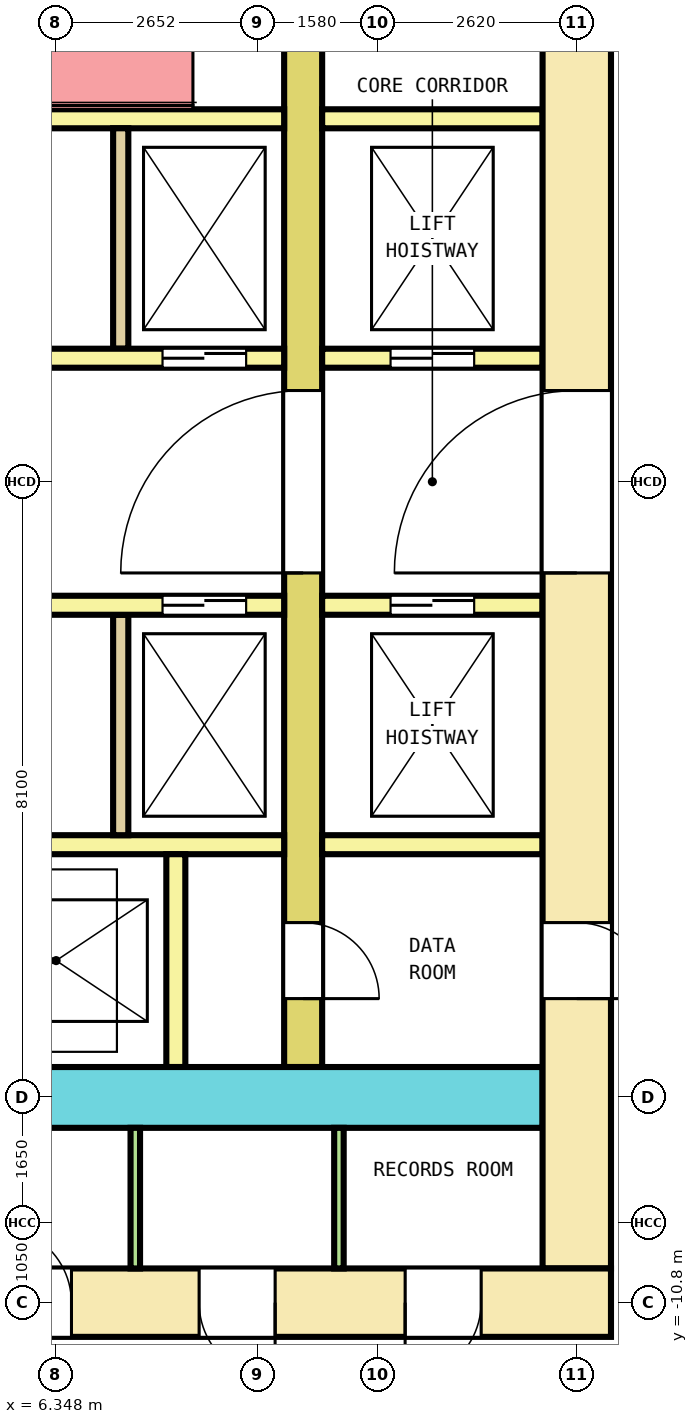
"""IFC4 building model, lengths in metres.
Left out: names, types, materials, properties, quantities, classifications, styles, units other than length and angle.
Written with IfcOpenShell. Run it as: python <this file> out.ifc"""

import sys

from ifc_helpers import new_model, si_unit, direction, frame, frame_2d, origin, place, context, subcontext, project, spatial, rectangle, extrude, element, fill, save


model = new_model("IFC4")
c1 = context("Model", 3, precision=1e-05, world=origin(), true_north=direction((0.0, 1.0)))
c2 = subcontext(c1, "Body", "Model", "MODEL_VIEW")
j1 = project(units=[si_unit("LENGTHUNIT", "METRE"), si_unit("PLANEANGLEUNIT", "RADIAN")], contexts=[c1])
p1 = place(None, origin())
s1 = spatial("IfcSite", under=j1, at=p1, CompositionType="ELEMENT")
p2 = place(p1, origin())
s2 = spatial("IfcBuilding", under=s1, at=p2, CompositionType="ELEMENT")
p3 = place(p2, frame((0.0, 0.0, 19.0)))
s3 = spatial("IfcBuildingStorey", under=s2, at=p3, CompositionType="ELEMENT", Elevation=19.0)
p4 = place(p3, frame((-13.65, -10.8, 0.0), z_axis=(0.0, 0.0, 1.0), x_axis=(1.0, 0.0, 0.0)))
e1 = element("IfcWall", 1, at=p4, inside=s3, PredefinedType="SHEAR", context=c2, shape_type="SweptSolid", body=[
    extrude(rectangle(XDim=27.3, YDim=0.9, at=frame_2d((13.65, 0.0))), origin(), (0.0, 0.0, 1.0), 4.1),
])
p5 = place(p4, frame((2.425, 0.0, 0.0)))
e2 = element("IfcOpeningElement", 2, at=p5, cuts=e1, PredefinedType="OPENING", context=c2, shape_type="SweptSolid", body=[
    extrude(rectangle(XDim=1.0, YDim=2.1, at=frame_2d((0.5, 1.05))), frame((0.0, 0.46, 0.0), z_axis=(0.0, -1.0, 0.0), x_axis=(1.0, 0.0, 0.0)), (0.0, 0.0, 1.0), 0.92),
])
p6 = place(p4, frame((6.569, 0.0, 0.0)))
e3 = element("IfcOpeningElement", 3, at=p6, cuts=e1, PredefinedType="OPENING", context=c2, shape_type="SweptSolid", body=[
    extrude(rectangle(XDim=1.0, YDim=2.1, at=frame_2d((0.5, 1.05))), frame((0.0, 0.46, 0.0), z_axis=(0.0, -1.0, 0.0), x_axis=(1.0, 0.0, 0.0)), (0.0, 0.0, 1.0), 0.92),
])
p7 = place(p4, frame((10.681, 0.0, 0.0)))
e4 = element("IfcOpeningElement", 4, at=p7, cuts=e1, PredefinedType="OPENING", context=c2, shape_type="SweptSolid", body=[
    extrude(rectangle(XDim=1.0, YDim=2.1, at=frame_2d((0.5, 1.05))), frame((0.0, 0.46, 0.0), z_axis=(0.0, -1.0, 0.0), x_axis=(1.0, 0.0, 0.0)), (0.0, 0.0, 1.0), 0.92),
])
p8 = place(p4, frame((19.202, 0.0, 0.0)))
e5 = element("IfcOpeningElement", 5, at=p8, cuts=e1, PredefinedType="OPENING", context=c2, shape_type="SweptSolid", body=[
    extrude(rectangle(XDim=1.0, YDim=2.1, at=frame_2d((0.5, 1.05))), frame((0.0, 0.46, 0.0), z_axis=(0.0, -1.0, 0.0), x_axis=(1.0, 0.0, 0.0)), (0.0, 0.0, 1.0), 0.92),
])
p9 = place(p4, frame((21.881, 0.0, 0.0)))
e6 = element("IfcOpeningElement", 6, at=p9, cuts=e1, PredefinedType="OPENING", context=c2, shape_type="SweptSolid", body=[
    extrude(rectangle(XDim=1.0, YDim=2.1, at=frame_2d((0.5, 1.05))), frame((0.0, 0.46, 0.0), z_axis=(0.0, -1.0, 0.0), x_axis=(1.0, 0.0, 0.0)), (0.0, 0.0, 1.0), 0.92),
])
p10 = place(p4, frame((24.592, 0.0, 0.0)))
e7 = element("IfcOpeningElement", 7, at=p10, cuts=e1, PredefinedType="OPENING", context=c2, shape_type="SweptSolid", body=[
    extrude(rectangle(XDim=1.0, YDim=2.1, at=frame_2d((0.5, 1.05))), frame((0.0, 0.46, 0.0), z_axis=(0.0, -1.0, 0.0), x_axis=(1.0, 0.0, 0.0)), (0.0, 0.0, 1.0), 0.92),
])
p11 = place(p4, frame((15.2, 0.0, 0.0)))
e8 = element("IfcOpeningElement", 8, at=p11, cuts=e1, PredefinedType="OPENING", context=c2, shape_type="SweptSolid", body=[
    extrude(rectangle(XDim=1.2, YDim=2.1, at=frame_2d((0.6, 1.05))), frame((0.0, 0.46, 0.0), z_axis=(0.0, -1.0, 0.0), x_axis=(1.0, 0.0, 0.0)), (0.0, 0.0, 1.0), 0.92),
])
p12 = place(p3, frame((13.2, -10.35, 0.0), z_axis=(0.0, 0.0, 1.0), x_axis=(0.0, 1.0, 0.0)))
e9 = element("IfcWall", 9, at=p12, inside=s3, PredefinedType="SHEAR", context=c2, shape_type="SweptSolid", body=[
    extrude(rectangle(XDim=20.7, YDim=0.9, at=frame_2d((10.35, 0.0))), origin(), (0.0, 0.0, 1.0), 4.1),
])
p13 = place(p12, frame((9.15, 0.0, 0.0)))
e10 = element("IfcOpeningElement", 10, at=p13, cuts=e9, PredefinedType="OPENING", context=c2, shape_type="SweptSolid", body=[
    extrude(rectangle(XDim=2.4, YDim=2.1, at=frame_2d((1.2, 1.05))), frame((0.0, 0.46, 0.0), z_axis=(0.0, -1.0, 0.0), x_axis=(1.0, 0.0, 0.0)), (0.0, 0.0, 1.0), 0.92),
])
p14 = place(p12, frame((16.05, 0.0, 0.0)))
e11 = element("IfcOpeningElement", 11, at=p14, cuts=e9, PredefinedType="OPENING", context=c2, shape_type="SweptSolid", body=[
    extrude(rectangle(XDim=1.2, YDim=2.1, at=frame_2d((0.6, 1.05))), frame((0.0, 0.46, 0.0), z_axis=(0.0, -1.0, 0.0), x_axis=(1.0, 0.0, 0.0)), (0.0, 0.0, 1.0), 0.92),
])
p15 = place(p12, frame((3.55, 0.0, 0.0)))
e12 = element("IfcOpeningElement", 12, at=p15, cuts=e9, PredefinedType="OPENING", context=c2, shape_type="SweptSolid", body=[
    extrude(rectangle(XDim=1.0, YDim=2.1, at=frame_2d((0.5, 1.05))), frame((0.0, 0.46, 0.0), z_axis=(0.0, -1.0, 0.0), x_axis=(1.0, 0.0, 0.0)), (0.0, 0.0, 1.0), 0.92),
])
p16 = place(p3, frame((-12.75, -8.1, 0.0), z_axis=(0.0, 0.0, 1.0), x_axis=(1.0, 0.0, 0.0)))
e13 = element("IfcWall", 13, at=p16, inside=s3, PredefinedType="SHEAR", context=c2, shape_type="SweptSolid", body=[
    extrude(rectangle(XDim=25.5, YDim=0.8, at=frame_2d((12.75, 0.0))), origin(), (0.0, 0.0, 1.0), 4.1),
])
p17 = place(p16, frame((14.3, 0.0, 0.0)))
e14 = element("IfcOpeningElement", 14, at=p17, cuts=e13, PredefinedType="OPENING", context=c2, shape_type="SweptSolid", body=[
    extrude(rectangle(XDim=1.2, YDim=2.1, at=frame_2d((0.6, 1.05))), frame((0.0, 0.41, 0.0), z_axis=(0.0, -1.0, 0.0), x_axis=(1.0, 0.0, 0.0)), (0.0, 0.0, 1.0), 0.82),
])
p18 = place(p3, frame((9.6, -7.7, 0.0), z_axis=(0.0, 0.0, 1.0), x_axis=(0.0, 1.0, 0.0)))
e15 = element("IfcWall", 15, at=p18, inside=s3, PredefinedType="SHEAR", context=c2, shape_type="SweptSolid", body=[
    extrude(rectangle(XDim=15.4, YDim=0.5, at=frame_2d((7.7, 0.0))), origin(), (0.0, 0.0, 1.0), 4.1),
])
p19 = place(p18, frame((6.5, 0.0, 0.0)))
e16 = element("IfcOpeningElement", 16, at=p19, cuts=e15, PredefinedType="OPENING", context=c2, shape_type="SweptSolid", body=[
    extrude(rectangle(XDim=2.4, YDim=2.1, at=frame_2d((1.2, 1.05))), frame((0.0, 0.26, 0.0), z_axis=(0.0, -1.0, 0.0), x_axis=(1.0, 0.0, 0.0)), (0.0, 0.0, 1.0), 0.52),
])
p20 = place(p18, frame((13.4, 0.0, 0.0)))
e17 = element("IfcOpeningElement", 17, at=p20, cuts=e15, PredefinedType="OPENING", context=c2, shape_type="SweptSolid", body=[
    extrude(rectangle(XDim=1.2, YDim=2.1, at=frame_2d((0.6, 1.05))), frame((0.0, 0.26, 0.0), z_axis=(0.0, -1.0, 0.0), x_axis=(1.0, 0.0, 0.0)), (0.0, 0.0, 1.0), 0.52),
])
p21 = place(p18, frame((0.9, 0.0, 0.0)))
e18 = element("IfcOpeningElement", 18, at=p21, cuts=e15, PredefinedType="OPENING", context=c2, shape_type="SweptSolid", body=[
    extrude(rectangle(XDim=1.0, YDim=2.1, at=frame_2d((0.5, 1.05))), frame((0.0, 0.26, 0.0), z_axis=(0.0, -1.0, 0.0), x_axis=(1.0, 0.0, 0.0)), (0.0, 0.0, 1.0), 0.52),
])
p22 = place(p3, frame((-9.35, 1.625, 0.0), z_axis=(0.0, 0.0, 1.0), x_axis=(1.0, 0.0, 0.0)))
e19 = element("IfcWall", 19, at=p22, inside=s3, PredefinedType="SOLIDWALL", context=c2, shape_type="SweptSolid", body=[
    extrude(rectangle(XDim=18.7, YDim=0.25, at=frame_2d((9.35, 0.0))), origin(), (0.0, 0.0, 1.0), 4.1),
])
p23 = place(p22, frame((0.5, 0.0, 0.0)))
e20 = element("IfcOpeningElement", 20, at=p23, cuts=e19, PredefinedType="OPENING", context=c2, shape_type="SweptSolid", body=[
    extrude(rectangle(XDim=1.1, YDim=2.1, at=frame_2d((0.55, 1.05))), frame((0.0, 0.135, 0.0), z_axis=(0.0, -1.0, 0.0), x_axis=(1.0, 0.0, 0.0)), (0.0, 0.0, 1.0), 0.27),
])
p24 = place(p22, frame((17.1, 0.0, 0.0)))
e21 = element("IfcOpeningElement", 21, at=p24, cuts=e19, PredefinedType="OPENING", context=c2, shape_type="SweptSolid", body=[
    extrude(rectangle(XDim=1.1, YDim=2.1, at=frame_2d((0.55, 1.05))), frame((0.0, 0.135, 0.0), z_axis=(0.0, -1.0, 0.0), x_axis=(1.0, 0.0, 0.0)), (0.0, 0.0, 1.0), 0.27),
])
p25 = place(p3, frame((9.85, 1.625, 0.0), z_axis=(0.0, 0.0, 1.0), x_axis=(1.0, 0.0, 0.0)))
e22 = element("IfcWall", 22, at=p25, inside=s3, PredefinedType="SOLIDWALL", context=c2, shape_type="SweptSolid", body=[
    extrude(rectangle(XDim=2.9, YDim=0.25, at=frame_2d((1.45, 0.0))), origin(), (0.0, 0.0, 1.0), 4.1),
])
p26 = place(p25, frame((0.9, 0.0, 0.0)))
e23 = element("IfcOpeningElement", 23, at=p26, cuts=e22, PredefinedType="OPENING", context=c2, shape_type="SweptSolid", body=[
    extrude(rectangle(XDim=1.1, YDim=2.1, at=frame_2d((0.55, 1.05))), frame((0.0, 0.135, 0.0), z_axis=(0.0, -1.0, 0.0), x_axis=(1.0, 0.0, 0.0)), (0.0, 0.0, 1.0), 0.27),
])
p27 = place(p3, frame((-9.35, 4.775, 0.0), z_axis=(0.0, 0.0, 1.0), x_axis=(1.0, 0.0, 0.0)))
e24 = element("IfcWall", 24, at=p27, inside=s3, PredefinedType="SOLIDWALL", context=c2, shape_type="SweptSolid", body=[
    extrude(rectangle(XDim=18.7, YDim=0.25, at=frame_2d((9.35, 0.0))), origin(), (0.0, 0.0, 1.0), 4.1),
])
p28 = place(p3, frame((9.85, 4.775, 0.0), z_axis=(0.0, 0.0, 1.0), x_axis=(1.0, 0.0, 0.0)))
e25 = element("IfcWall", 25, at=p28, inside=s3, PredefinedType="SOLIDWALL", context=c2, shape_type="SweptSolid", body=[
    extrude(rectangle(XDim=2.9, YDim=0.25, at=frame_2d((1.45, 0.0))), origin(), (0.0, 0.0, 1.0), 4.1),
])
p29 = place(p3, frame((7.2, 1.75, 0.0), z_axis=(0.0, 0.0, 1.0), x_axis=(0.0, 1.0, 0.0)))
e26 = element("IfcWall", 26, at=p29, inside=s3, PredefinedType="SOLIDWALL", context=c2, shape_type="SweptSolid", body=[
    extrude(rectangle(XDim=2.9, YDim=0.2, at=frame_2d((1.45, 0.0))), origin(), (0.0, 0.0, 1.0), 4.1),
])
p30 = place(p3, frame((-9.35, -1.625, 0.0), z_axis=(0.0, 0.0, 1.0), x_axis=(1.0, 0.0, 0.0)))
e27 = element("IfcWall", 27, at=p30, inside=s3, PredefinedType="SOLIDWALL", context=c2, shape_type="SweptSolid", body=[
    extrude(rectangle(XDim=18.7, YDim=0.25, at=frame_2d((9.35, 0.0))), origin(), (0.0, 0.0, 1.0), 4.1),
])
p31 = place(p30, frame((0.5, 0.0, 0.0)))
e28 = element("IfcOpeningElement", 28, at=p31, cuts=e27, PredefinedType="OPENING", context=c2, shape_type="SweptSolid", body=[
    extrude(rectangle(XDim=1.1, YDim=2.1, at=frame_2d((0.55, 1.05))), frame((0.0, 0.135, 0.0), z_axis=(0.0, -1.0, 0.0), x_axis=(1.0, 0.0, 0.0)), (0.0, 0.0, 1.0), 0.27),
])
p32 = place(p30, frame((17.1, 0.0, 0.0)))
e29 = element("IfcOpeningElement", 29, at=p32, cuts=e27, PredefinedType="OPENING", context=c2, shape_type="SweptSolid", body=[
    extrude(rectangle(XDim=1.1, YDim=2.1, at=frame_2d((0.55, 1.05))), frame((0.0, 0.135, 0.0), z_axis=(0.0, -1.0, 0.0), x_axis=(1.0, 0.0, 0.0)), (0.0, 0.0, 1.0), 0.27),
])
p33 = place(p3, frame((9.85, -1.625, 0.0), z_axis=(0.0, 0.0, 1.0), x_axis=(1.0, 0.0, 0.0)))
e30 = element("IfcWall", 30, at=p33, inside=s3, PredefinedType="SOLIDWALL", context=c2, shape_type="SweptSolid", body=[
    extrude(rectangle(XDim=2.9, YDim=0.25, at=frame_2d((1.45, 0.0))), origin(), (0.0, 0.0, 1.0), 4.1),
])
p34 = place(p33, frame((0.9, 0.0, 0.0)))
e31 = element("IfcOpeningElement", 31, at=p34, cuts=e30, PredefinedType="OPENING", context=c2, shape_type="SweptSolid", body=[
    extrude(rectangle(XDim=1.1, YDim=2.1, at=frame_2d((0.55, 1.05))), frame((0.0, 0.135, 0.0), z_axis=(0.0, -1.0, 0.0), x_axis=(1.0, 0.0, 0.0)), (0.0, 0.0, 1.0), 0.27),
])
p35 = place(p3, frame((-9.35, -4.775, 0.0), z_axis=(0.0, 0.0, 1.0), x_axis=(1.0, 0.0, 0.0)))
e32 = element("IfcWall", 32, at=p35, inside=s3, PredefinedType="SOLIDWALL", context=c2, shape_type="SweptSolid", body=[
    extrude(rectangle(XDim=18.7, YDim=0.25, at=frame_2d((9.35, 0.0))), origin(), (0.0, 0.0, 1.0), 4.1),
])
p36 = place(p3, frame((9.85, -4.775, 0.0), z_axis=(0.0, 0.0, 1.0), x_axis=(1.0, 0.0, 0.0)))
e33 = element("IfcWall", 33, at=p36, inside=s3, PredefinedType="SOLIDWALL", context=c2, shape_type="SweptSolid", body=[
    extrude(rectangle(XDim=2.9, YDim=0.25, at=frame_2d((1.45, 0.0))), origin(), (0.0, 0.0, 1.0), 4.1),
])
p37 = place(p3, frame((7.2, -4.65, 0.0), z_axis=(0.0, 0.0, 1.0), x_axis=(0.0, 1.0, 0.0)))
e34 = element("IfcWall", 34, at=p37, inside=s3, PredefinedType="SOLIDWALL", context=c2, shape_type="SweptSolid", body=[
    extrude(rectangle(XDim=2.9, YDim=0.2, at=frame_2d((1.45, 0.0))), origin(), (0.0, 0.0, 1.0), 4.1),
])
p38 = place(p3, frame((7.925, -7.7, 0.0), z_axis=(0.0, 0.0, 1.0), x_axis=(0.0, 1.0, 0.0)))
e35 = element("IfcWall", 35, at=p38, inside=s3, PredefinedType="SOLIDWALL", context=c2, shape_type="SweptSolid", body=[
    extrude(rectangle(XDim=2.8, YDim=0.25, at=frame_2d((1.4, 0.0))), origin(), (0.0, 0.0, 1.0), 4.1),
])
for number, where, z_axis, x_axis in (
    (36, (7.392, -10.35, 0.0), (0.0, 0.0, 1.0), (0.0, 1.0, 0.0)),
    (37, (10.071, -10.35, 0.0), (0.0, 0.0, 1.0), (0.0, 1.0, 0.0)),
):
    element("IfcWall", number, at=place(p3, frame(where, z_axis=z_axis, x_axis=x_axis)), inside=s3, PredefinedType="PARTITIONING", context=c2, shape_type="SweptSolid", body=[
        extrude(rectangle(XDim=1.85, YDim=0.125, at=frame_2d((0.925, 0.0))), origin(), (0.0, 0.0, 1.0), 4.1),
    ])
p39 = place(p24, origin())
e38 = element("IfcDoor", 38, at=p39, inside=s3, OperationType="DOUBLE_DOOR_SLIDING", PredefinedType="DOOR", context=c2, shape_type="SweptSolid", body=[
    extrude(rectangle(XDim=1.1, YDim=2.1, at=frame_2d((0.55, 1.05))), frame((0.0, 0.075, 0.0), z_axis=(0.0, -1.0, 0.0), x_axis=(1.0, 0.0, 0.0)), (0.0, 0.0, 1.0), 0.15),
])
fill(e21, e38)
p40 = place(p26, origin())
e39 = element("IfcDoor", 39, at=p40, inside=s3, OperationType="DOUBLE_DOOR_SLIDING", PredefinedType="DOOR", context=c2, shape_type="SweptSolid", body=[
    extrude(rectangle(XDim=1.1, YDim=2.1, at=frame_2d((0.55, 1.05))), frame((0.0, 0.075, 0.0), z_axis=(0.0, -1.0, 0.0), x_axis=(1.0, 0.0, 0.0)), (0.0, 0.0, 1.0), 0.15),
])
fill(e23, e39)
p41 = place(p32, origin())
e40 = element("IfcDoor", 40, at=p41, inside=s3, OperationType="DOUBLE_DOOR_SLIDING", PredefinedType="DOOR", context=c2, shape_type="SweptSolid", body=[
    extrude(rectangle(XDim=1.1, YDim=2.1, at=frame_2d((0.55, 1.05))), frame((0.0, 0.075, 0.0), z_axis=(0.0, -1.0, 0.0), x_axis=(1.0, 0.0, 0.0)), (0.0, 0.0, 1.0), 0.15),
])
fill(e29, e40)
p42 = place(p34, origin())
e41 = element("IfcDoor", 41, at=p42, inside=s3, OperationType="DOUBLE_DOOR_SLIDING", PredefinedType="DOOR", context=c2, shape_type="SweptSolid", body=[
    extrude(rectangle(XDim=1.1, YDim=2.1, at=frame_2d((0.55, 1.05))), frame((0.0, 0.075, 0.0), z_axis=(0.0, -1.0, 0.0), x_axis=(1.0, 0.0, 0.0)), (0.0, 0.0, 1.0), 0.15),
])
fill(e31, e41)
p43 = place(p19, origin())
e42 = element("IfcDoor", 42, at=p43, inside=s3, OperationType="DOUBLE_DOOR_SINGLE_SWING", PredefinedType="DOOR", context=c2, shape_type="SweptSolid", body=[
    extrude(rectangle(XDim=2.4, YDim=2.1, at=frame_2d((1.2, 1.05))), frame((0.0, 0.2, 0.0), z_axis=(0.0, -1.0, 0.0), x_axis=(1.0, 0.0, 0.0)), (0.0, 0.0, 1.0), 0.4),
])
fill(e16, e42)
p44 = place(p13, origin())
e43 = element("IfcDoor", 43, at=p44, inside=s3, OperationType="DOUBLE_DOOR_SINGLE_SWING", PredefinedType="DOOR", context=c2, shape_type="SweptSolid", body=[
    extrude(rectangle(XDim=2.4, YDim=2.1, at=frame_2d((1.2, 1.05))), frame((0.0, 0.3, 0.0), z_axis=(0.0, -1.0, 0.0), x_axis=(1.0, 0.0, 0.0)), (0.0, 0.0, 1.0), 0.6),
])
fill(e10, e43)
p45 = place(p21, origin())
e44 = element("IfcDoor", 44, at=p45, inside=s3, OperationType="SINGLE_SWING_RIGHT", PredefinedType="DOOR", context=c2, shape_type="SweptSolid", body=[
    extrude(rectangle(XDim=1.0, YDim=2.1, at=frame_2d((0.5, 1.05))), frame((0.0, 0.2, 0.0), z_axis=(0.0, -1.0, 0.0), x_axis=(1.0, 0.0, 0.0)), (0.0, 0.0, 1.0), 0.4),
])
fill(e18, e44)
p46 = place(p15, origin())
e45 = element("IfcDoor", 45, at=p46, inside=s3, OperationType="SINGLE_SWING_LEFT", PredefinedType="DOOR", context=c2, shape_type="SweptSolid", body=[
    extrude(rectangle(XDim=1.0, YDim=2.1, at=frame_2d((0.5, 1.05))), frame((0.0, 0.3, 0.0), z_axis=(0.0, -1.0, 0.0), x_axis=(1.0, 0.0, 0.0)), (0.0, 0.0, 1.0), 0.6),
])
fill(e12, e45)
p47 = place(p8, origin())
e46 = element("IfcDoor", 46, at=p47, inside=s3, OperationType="SINGLE_SWING_LEFT", PredefinedType="DOOR", context=c2, shape_type="SweptSolid", body=[
    extrude(rectangle(XDim=1.0, YDim=2.1, at=frame_2d((0.5, 1.05))), frame((0.0, 0.3, 0.0), z_axis=(0.0, -1.0, 0.0), x_axis=(1.0, 0.0, 0.0)), (0.0, 0.0, 1.0), 0.6),
])
fill(e5, e46)
p48 = place(p9, origin())
e47 = element("IfcDoor", 47, at=p48, inside=s3, OperationType="SINGLE_SWING_RIGHT", PredefinedType="DOOR", context=c2, shape_type="SweptSolid", body=[
    extrude(rectangle(XDim=1.0, YDim=2.1, at=frame_2d((0.5, 1.05))), frame((0.0, 0.3, 0.0), z_axis=(0.0, -1.0, 0.0), x_axis=(1.0, 0.0, 0.0)), (0.0, 0.0, 1.0), 0.6),
])
fill(e6, e47)
p49 = place(p10, origin())
e48 = element("IfcDoor", 48, at=p49, inside=s3, OperationType="SINGLE_SWING_LEFT", PredefinedType="DOOR", context=c2, shape_type="SweptSolid", body=[
    extrude(rectangle(XDim=1.0, YDim=2.1, at=frame_2d((0.5, 1.05))), frame((0.0, 0.3, 0.0), z_axis=(0.0, -1.0, 0.0), x_axis=(1.0, 0.0, 0.0)), (0.0, 0.0, 1.0), 0.6),
])
fill(e7, e48)
save(model, sys.argv[1])
